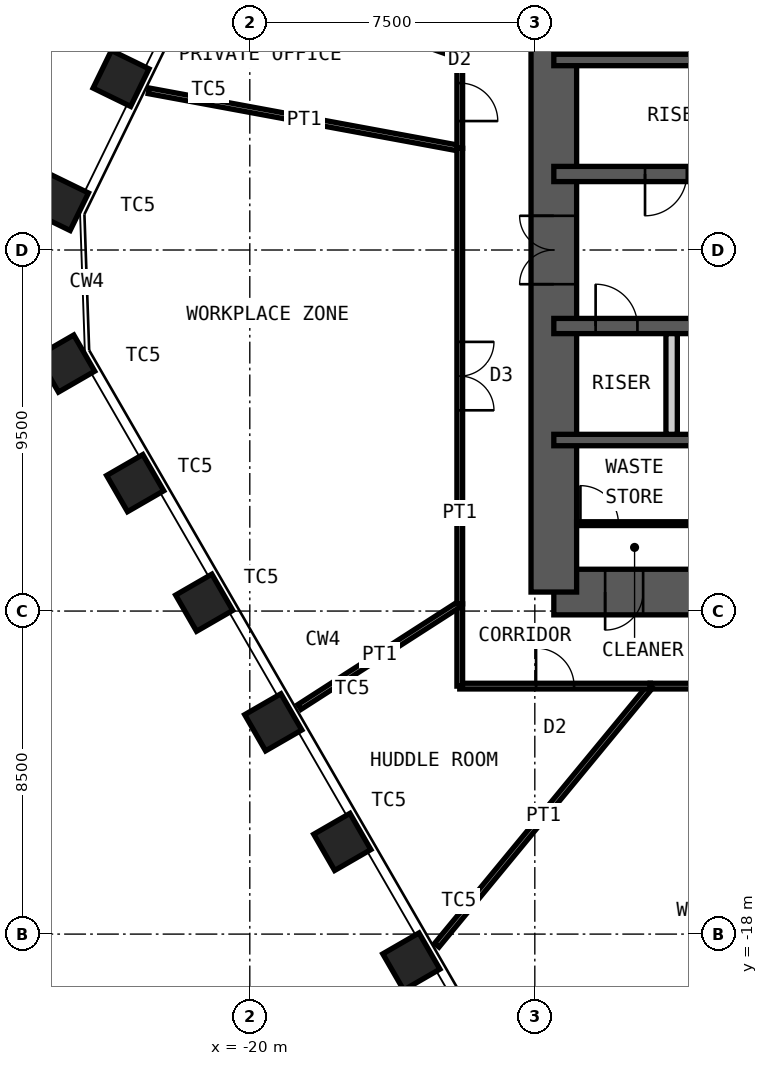
"""IFC4 building model, lengths in metres.
Left out: names, types, materials, properties, quantities, classifications, styles, units other than length and angle.
Written with IfcOpenShell. Run it as: python <this file> out.ifc"""

import sys

from ifc_helpers import new_model, si_unit, direction, frame, frame_2d, origin, origin_2d, place, context, subcontext, project, spatial, rectangle, hollow_rectangle, extrude, element, fill, save


model = new_model("IFC4")
c1 = context("Model", 3, precision=1e-05, world=origin(), true_north=direction((0.0, 1.0)))
c2 = subcontext(c1, "Body", "Model", "MODEL_VIEW")
j1 = project(units=[si_unit("LENGTHUNIT", "METRE"), si_unit("PLANEANGLEUNIT", "RADIAN")], contexts=[c1])
p1 = place(None, origin())
s1 = spatial("IfcSite", under=j1, at=p1, CompositionType="ELEMENT")
p2 = place(p1, origin())
s2 = spatial("IfcBuilding", under=s1, at=p2, CompositionType="ELEMENT")
p3 = place(p2, frame((0.0, 0.0, 193.0)))
s3 = spatial("IfcBuildingStorey", under=s2, at=p3, CompositionType="ELEMENT", Elevation=193.0)
for number, where, z_axis, x_axis in (
    (1, (-15.749, -18.721, 0.0), (0.0, 0.0, 1.0), (0.5, -0.866, 0.0)),
    (2, (-17.566, -15.574, 0.0), (0.0, 0.0, 1.0), (0.5, -0.866, 0.0)),
    (3, (-19.383, -12.428, 0.0), (0.0, 0.0, 1.0), (0.5, -0.866, 0.0)),
    (4, (-21.2, -9.281, 0.0), (0.0, 0.0, 1.0), (0.5, -0.866, 0.0)),
    (5, (-23.016, -6.134, 0.0), (0.0, 0.0, 1.0), (0.5, -0.866, 0.0)),
    (6, (-24.833, -2.988, 0.0), (0.0, 0.0, 1.0), (0.5, -0.866, 0.0)),
    (7, (-24.981, 1.248, 0.0), (0.0, 0.0, 1.0), (-0.438, -0.899, 0.0)),
    (8, (-23.388, 4.514, 0.0), (0.0, 0.0, 1.0), (-0.438, -0.899, 0.0)),
):
    element("IfcColumn", number, at=place(p3, frame(where, z_axis=z_axis, x_axis=x_axis)), inside=s3, PredefinedType="COLUMN", context=c2, shape_type="SweptSolid", body=[
        extrude(hollow_rectangle(XDim=1.1, YDim=1.1, WallThickness=0.07, at=origin_2d()), origin(), (0.0, 0.0, 1.0), 4.2),
    ])
p4 = place(p3, frame((-12.0, -9.0, 0.0), z_axis=(0.0, 0.0, 1.0), x_axis=(1.0, 0.0, 0.0)))
e9 = element("IfcWall", 9, at=p4, inside=s3, PredefinedType="SHEAR", context=c2, shape_type="SweptSolid", body=[
    extrude(rectangle(XDim=24.0, YDim=1.2, at=frame_2d((12.0, 0.0))), origin(), (0.0, 0.0, 1.0), 4.2),
])
p5 = place(p4, frame((1.35, 0.0, 0.0)))
e10 = element("IfcOpeningElement", 10, at=p5, cuts=e9, PredefinedType="OPENING", context=c2, shape_type="SweptSolid", body=[
    extrude(rectangle(XDim=1.0, YDim=2.1, at=frame_2d((0.5, 1.05))), frame((0.0, 0.61, 0.0), z_axis=(0.0, -1.0, 0.0), x_axis=(1.0, 0.0, 0.0)), (0.0, 0.0, 1.0), 1.22),
])
p6 = place(p4, frame((5.325, 0.0, 0.0)))
e11 = element("IfcOpeningElement", 11, at=p6, cuts=e9, PredefinedType="OPENING", context=c2, shape_type="SweptSolid", body=[
    extrude(rectangle(XDim=1.15, YDim=2.1, at=frame_2d((0.575, 1.05))), frame((0.0, 0.61, 0.0), z_axis=(0.0, -1.0, 0.0), x_axis=(1.0, 0.0, 0.0)), (0.0, 0.0, 1.0), 1.22),
])
p7 = place(p4, frame((12.6, 0.0, 0.0)))
e12 = element("IfcOpeningElement", 12, at=p7, cuts=e9, PredefinedType="OPENING", context=c2, shape_type="SweptSolid", body=[
    extrude(rectangle(XDim=1.0, YDim=2.1, at=frame_2d((0.5, 1.05))), frame((0.0, 0.61, 0.0), z_axis=(0.0, -1.0, 0.0), x_axis=(1.0, 0.0, 0.0)), (0.0, 0.0, 1.0), 1.22),
])
p8 = place(p3, frame((-12.0, -9.0, 0.0), z_axis=(0.0, 0.0, 1.0), x_axis=(0.0, 1.0, 0.0)))
e13 = element("IfcWall", 13, at=p8, inside=s3, PredefinedType="SHEAR", context=c2, shape_type="SweptSolid", body=[
    extrude(rectangle(XDim=18.0, YDim=1.2, at=frame_2d((9.0, 0.0))), origin(), (0.0, 0.0, 1.0), 4.2),
])
p9 = place(p8, frame((8.1, 0.0, 0.0)))
e14 = element("IfcOpeningElement", 14, at=p9, cuts=e13, PredefinedType="OPENING", context=c2, shape_type="SweptSolid", body=[
    extrude(rectangle(XDim=1.8, YDim=2.1, at=frame_2d((0.9, 1.05))), frame((0.0, 0.61, 0.0), z_axis=(0.0, -1.0, 0.0), x_axis=(1.0, 0.0, 0.0)), (0.0, 0.0, 1.0), 1.22),
])
p10 = place(p3, frame((-12.0, 5.0, 0.0), z_axis=(0.0, 0.0, 1.0), x_axis=(1.0, 0.0, 0.0)))
e15 = element("IfcWall", 15, at=p10, inside=s3, PredefinedType="SHEAR", context=c2, shape_type="SweptSolid", body=[
    extrude(rectangle(XDim=24.0, YDim=0.3, at=frame_2d((12.0, 0.0))), origin(), (0.0, 0.0, 1.0), 4.2),
])
p11 = place(p3, frame((-12.0, 2.0, 0.0), z_axis=(0.0, 0.0, 1.0), x_axis=(1.0, 0.0, 0.0)))
e16 = element("IfcWall", 16, at=p11, inside=s3, PredefinedType="SHEAR", context=c2, shape_type="SweptSolid", body=[
    extrude(rectangle(XDim=24.0, YDim=0.4, at=frame_2d((12.0, 0.0))), origin(), (0.0, 0.0, 1.0), 4.2),
])
p12 = place(p11, frame((2.4, 0.0, 0.0)))
e17 = element("IfcOpeningElement", 17, at=p12, cuts=e16, PredefinedType="OPENING", context=c2, shape_type="SweptSolid", body=[
    extrude(rectangle(XDim=1.1, YDim=2.1, at=frame_2d((0.55, 1.05))), frame((0.0, 0.21, 0.0), z_axis=(0.0, -1.0, 0.0), x_axis=(1.0, 0.0, 0.0)), (0.0, 0.0, 1.0), 0.42),
])
p13 = place(p11, frame((22.0, 0.0, 0.0)))
e18 = element("IfcOpeningElement", 18, at=p13, cuts=e16, PredefinedType="OPENING", context=c2, shape_type="SweptSolid", body=[
    extrude(rectangle(XDim=1.1, YDim=2.1, at=frame_2d((0.55, 1.05))), frame((0.0, 0.21, 0.0), z_axis=(0.0, -1.0, 0.0), x_axis=(1.0, 0.0, 0.0)), (0.0, 0.0, 1.0), 0.42),
])
p14 = place(p11, frame((10.15, 0.0, 0.0)))
e19 = element("IfcOpeningElement", 19, at=p14, cuts=e16, PredefinedType="OPENING", context=c2, shape_type="SweptSolid", body=[
    extrude(rectangle(XDim=1.0, YDim=2.1, at=frame_2d((0.5, 1.05))), frame((0.0, 0.21, 0.0), z_axis=(0.0, -1.0, 0.0), x_axis=(1.0, 0.0, 0.0)), (0.0, 0.0, 1.0), 0.42),
])
p15 = place(p11, frame((6.9, 0.0, 0.0)))
e20 = element("IfcOpeningElement", 20, at=p15, cuts=e16, PredefinedType="OPENING", context=c2, shape_type="SweptSolid", body=[
    extrude(rectangle(XDim=1.0, YDim=2.1, at=frame_2d((0.5, 1.05))), frame((0.0, 0.21, 0.0), z_axis=(0.0, -1.0, 0.0), x_axis=(1.0, 0.0, 0.0)), (0.0, 0.0, 1.0), 0.42),
])
p16 = place(p11, frame((13.35, 0.0, 0.0)))
e21 = element("IfcOpeningElement", 21, at=p16, cuts=e16, PredefinedType="OPENING", context=c2, shape_type="SweptSolid", body=[
    extrude(rectangle(XDim=1.1, YDim=2.4, at=frame_2d((0.55, 1.2))), frame((0.0, 0.21, 0.0), z_axis=(0.0, -1.0, 0.0), x_axis=(1.0, 0.0, 0.0)), (0.0, 0.0, 1.0), 0.42),
])
p17 = place(p11, frame((16.15, 0.0, 0.0)))
e22 = element("IfcOpeningElement", 22, at=p17, cuts=e16, PredefinedType="OPENING", context=c2, shape_type="SweptSolid", body=[
    extrude(rectangle(XDim=1.1, YDim=2.4, at=frame_2d((0.55, 1.2))), frame((0.0, 0.21, 0.0), z_axis=(0.0, -1.0, 0.0), x_axis=(1.0, 0.0, 0.0)), (0.0, 0.0, 1.0), 0.42),
])
p18 = place(p11, frame((18.95, 0.0, 0.0)))
e23 = element("IfcOpeningElement", 23, at=p18, cuts=e16, PredefinedType="OPENING", context=c2, shape_type="SweptSolid", body=[
    extrude(rectangle(XDim=1.1, YDim=2.4, at=frame_2d((0.55, 1.2))), frame((0.0, 0.21, 0.0), z_axis=(0.0, -1.0, 0.0), x_axis=(1.0, 0.0, 0.0)), (0.0, 0.0, 1.0), 0.42),
])
p19 = place(p3, frame((-12.0, -2.0, 0.0), z_axis=(0.0, 0.0, 1.0), x_axis=(1.0, 0.0, 0.0)))
e24 = element("IfcWall", 24, at=p19, inside=s3, PredefinedType="SHEAR", context=c2, shape_type="SweptSolid", body=[
    extrude(rectangle(XDim=24.0, YDim=0.4, at=frame_2d((12.0, 0.0))), origin(), (0.0, 0.0, 1.0), 4.2),
])
p20 = place(p19, frame((1.1, 0.0, 0.0)))
e25 = element("IfcOpeningElement", 25, at=p20, cuts=e24, PredefinedType="OPENING", context=c2, shape_type="SweptSolid", body=[
    extrude(rectangle(XDim=1.1, YDim=2.1, at=frame_2d((0.55, 1.05))), frame((0.0, 0.21, 0.0), z_axis=(0.0, -1.0, 0.0), x_axis=(1.0, 0.0, 0.0)), (0.0, 0.0, 1.0), 0.42),
])
p21 = place(p19, frame((13.55, 0.0, 0.0)))
e26 = element("IfcOpeningElement", 26, at=p21, cuts=e24, PredefinedType="OPENING", context=c2, shape_type="SweptSolid", body=[
    extrude(rectangle(XDim=1.1, YDim=2.1, at=frame_2d((0.55, 1.05))), frame((0.0, 0.21, 0.0), z_axis=(0.0, -1.0, 0.0), x_axis=(1.0, 0.0, 0.0)), (0.0, 0.0, 1.0), 0.42),
])
p22 = place(p19, frame((20.7, 0.0, 0.0)))
e27 = element("IfcOpeningElement", 27, at=p22, cuts=e24, PredefinedType="OPENING", context=c2, shape_type="SweptSolid", body=[
    extrude(rectangle(XDim=1.1, YDim=2.1, at=frame_2d((0.55, 1.05))), frame((0.0, 0.21, 0.0), z_axis=(0.0, -1.0, 0.0), x_axis=(1.0, 0.0, 0.0)), (0.0, 0.0, 1.0), 0.42),
])
p23 = place(p19, frame((4.0, 0.0, 0.0)))
e28 = element("IfcOpeningElement", 28, at=p23, cuts=e24, PredefinedType="OPENING", context=c2, shape_type="SweptSolid", body=[
    extrude(rectangle(XDim=1.0, YDim=2.1, at=frame_2d((0.5, 1.05))), frame((0.0, 0.21, 0.0), z_axis=(0.0, -1.0, 0.0), x_axis=(1.0, 0.0, 0.0)), (0.0, 0.0, 1.0), 0.42),
])
p24 = place(p19, frame((6.8, 0.0, 0.0)))
e29 = element("IfcOpeningElement", 29, at=p24, cuts=e24, PredefinedType="OPENING", context=c2, shape_type="SweptSolid", body=[
    extrude(rectangle(XDim=1.0, YDim=2.1, at=frame_2d((0.5, 1.05))), frame((0.0, 0.21, 0.0), z_axis=(0.0, -1.0, 0.0), x_axis=(1.0, 0.0, 0.0)), (0.0, 0.0, 1.0), 0.42),
])
p25 = place(p3, frame((-12.0, -5.0, 0.0), z_axis=(0.0, 0.0, 1.0), x_axis=(1.0, 0.0, 0.0)))
e30 = element("IfcWall", 30, at=p25, inside=s3, PredefinedType="SHEAR", context=c2, shape_type="SweptSolid", body=[
    extrude(rectangle(XDim=24.0, YDim=0.3, at=frame_2d((12.0, 0.0))), origin(), (0.0, 0.0, 1.0), 4.2),
])
p26 = place(p3, frame((-8.9, -4.85, 0.0), z_axis=(0.0, 0.0, 1.0), x_axis=(0.0, 1.0, 0.0)))
e31 = element("IfcWall", 31, at=p26, inside=s3, PredefinedType="PARTITIONING", context=c2, shape_type="SweptSolid", body=[
    extrude(rectangle(XDim=2.65, YDim=0.3, at=frame_2d((1.325, 0.0))), origin(), (0.0, 0.0, 1.0), 3.98),
])
p27 = place(p3, frame((-11.4, -7.2, 0.0), z_axis=(0.0, 0.0, 1.0), x_axis=(1.0, 0.0, 0.0)))
e32 = element("IfcWall", 32, at=p27, inside=s3, PredefinedType="PARTITIONING", context=c2, shape_type="SweptSolid", body=[
    extrude(rectangle(XDim=3.05, YDim=0.1, at=frame_2d((1.525, 0.0))), origin(), (0.0, 0.0, 1.0), 3.98),
])
p28 = place(p27, frame((0.1, 0.0, 0.0)))
e33 = element("IfcOpeningElement", 33, at=p28, cuts=e32, PredefinedType="OPENING", context=c2, shape_type="SweptSolid", body=[
    extrude(rectangle(XDim=1.0, YDim=2.4, at=frame_2d((0.5, 1.2))), frame((0.0, 0.06, 0.0), z_axis=(0.0, -1.0, 0.0), x_axis=(1.0, 0.0, 0.0)), (0.0, 0.0, 1.0), 0.12),
])
p29 = place(p3, frame((-22.661, 4.189, 0.0), z_axis=(0.0, 0.0, 1.0), x_axis=(0.983345347199, -0.181746879316, 0.0)))
e34 = element("IfcWall", 34, at=p29, inside=s3, PredefinedType="PARTITIONING", context=c2, shape_type="SweptSolid", body=[
    extrude(rectangle(XDim=8.324, YDim=0.15, at=frame_2d((4.162, 0.0))), origin(), (0.0, 0.0, 1.0), 3.43),
])
p30 = place(p3, frame((-14.475, 2.676, 0.0), z_axis=(0.0, 0.0, 1.0), x_axis=(0.0, 1.0, 0.0)))
e35 = element("IfcWall", 35, at=p30, inside=s3, PredefinedType="PARTITIONING", context=c2, shape_type="SweptSolid", body=[
    extrude(rectangle(XDim=2.435, YDim=0.15, at=frame_2d((1.217, 0.0))), origin(), (0.0, 0.0, 1.0), 4.03),
])
p31 = place(p30, frame((0.717, 0.0, 0.0)))
e36 = element("IfcOpeningElement", 36, at=p31, cuts=e35, PredefinedType="OPENING", context=c2, shape_type="SweptSolid", body=[
    extrude(rectangle(XDim=1.0, YDim=2.4, at=frame_2d((0.5, 1.2))), frame((0.0, 0.085, 0.0), z_axis=(0.0, -1.0, 0.0), x_axis=(1.0, 0.0, 0.0)), (0.0, 0.0, 1.0), 0.17),
])
p32 = place(p3, frame((-21.072, 7.439, 0.0), z_axis=(0.0, 0.0, 1.0), x_axis=(0.94295553867, -0.332918686907, 0.0)))
e37 = element("IfcWall", 37, at=p32, inside=s3, PredefinedType="PARTITIONING", context=c2, shape_type="SweptSolid", body=[
    extrude(rectangle(XDim=6.996, YDim=0.15, at=frame_2d((3.498, 0.0))), origin(), (0.0, 0.0, 1.0), 3.43),
])
p33 = place(p3, frame((-14.475, 5.11, 0.0), z_axis=(0.0, 0.0, 1.0), x_axis=(0.0, 1.0, 0.0)))
e38 = element("IfcWall", 38, at=p33, inside=s3, PredefinedType="PARTITIONING", context=c2, shape_type="SweptSolid", body=[
    extrude(rectangle(XDim=2.831, YDim=0.15, at=frame_2d((1.416, 0.0))), origin(), (0.0, 0.0, 1.0), 4.03),
])
p34 = place(p33, frame((0.916, 0.0, 0.0)))
e39 = element("IfcOpeningElement", 39, at=p34, cuts=e38, PredefinedType="OPENING", context=c2, shape_type="SweptSolid", body=[
    extrude(rectangle(XDim=1.0, YDim=2.4, at=frame_2d((0.5, 1.2))), frame((0.0, 0.085, 0.0), z_axis=(0.0, -1.0, 0.0), x_axis=(1.0, 0.0, 0.0)), (0.0, 0.0, 1.0), 0.17),
])
p35 = place(p3, frame((4.07, -11.475, 0.0), z_axis=(0.0, 0.0, 1.0), x_axis=(-1.0, 0.0, 0.0)))
e40 = element("IfcWall", 40, at=p35, inside=s3, PredefinedType="PARTITIONING", context=c2, shape_type="SweptSolid", body=[
    extrude(rectangle(XDim=13.528, YDim=0.15, at=frame_2d((6.764, 0.0))), origin(), (0.0, 0.0, 1.0), 4.03),
])
p36 = place(p35, frame((5.864, 0.0, 0.0)))
e41 = element("IfcOpeningElement", 41, at=p36, cuts=e40, PredefinedType="OPENING", context=c2, shape_type="SweptSolid", body=[
    extrude(rectangle(XDim=1.8, YDim=2.4, at=frame_2d((0.9, 1.2))), frame((0.0, 0.085, 0.0), z_axis=(0.0, -1.0, 0.0), x_axis=(1.0, 0.0, 0.0)), (0.0, 0.0, 1.0), 0.17),
])
p37 = place(p3, frame((-15.08, -18.294, 0.0), z_axis=(0.0, 0.0, 1.0), x_axis=(0.636052894953, 0.771645459277, 0.0)))
e42 = element("IfcWall", 42, at=p37, inside=s3, PredefinedType="PARTITIONING", context=c2, shape_type="SweptSolid", body=[
    extrude(rectangle(XDim=8.837, YDim=0.15, at=frame_2d((4.418, 0.0))), origin(), (0.0, 0.0, 1.0), 3.43),
])
p38 = place(p3, frame((-9.459, -11.475, 0.0), z_axis=(0.0, 0.0, 1.0), x_axis=(-1.0, 0.0, 0.0)))
e43 = element("IfcWall", 43, at=p38, inside=s3, PredefinedType="PARTITIONING", context=c2, shape_type="SweptSolid", body=[
    extrude(rectangle(XDim=5.016, YDim=0.15, at=frame_2d((2.508, 0.0))), origin(), (0.0, 0.0, 1.0), 4.03),
])
p39 = place(p38, frame((2.008, 0.0, 0.0)))
e44 = element("IfcOpeningElement", 44, at=p39, cuts=e43, PredefinedType="OPENING", context=c2, shape_type="SweptSolid", body=[
    extrude(rectangle(XDim=1.0, YDim=2.4, at=frame_2d((0.5, 1.2))), frame((0.0, 0.085, 0.0), z_axis=(0.0, -1.0, 0.0), x_axis=(1.0, 0.0, 0.0)), (0.0, 0.0, 1.0), 0.17),
])
p40 = place(p3, frame((-14.475, -11.475, 0.0), z_axis=(0.0, 0.0, 1.0), x_axis=(0.0, 1.0, 0.0)))
e45 = element("IfcWall", 45, at=p40, inside=s3, PredefinedType="PARTITIONING", context=c2, shape_type="SweptSolid", body=[
    extrude(rectangle(XDim=2.164, YDim=0.15, at=frame_2d((1.082, 0.0))), origin(), (0.0, 0.0, 1.0), 4.03),
])
p41 = place(p3, frame((-18.693, -12.024, 0.0), z_axis=(0.0, 0.0, 1.0), x_axis=(0.841031335058, 0.540986407824, 0.0)))
e46 = element("IfcWall", 46, at=p41, inside=s3, PredefinedType="PARTITIONING", context=c2, shape_type="SweptSolid", body=[
    extrude(rectangle(XDim=5.015, YDim=0.15, at=frame_2d((2.507, 0.0))), origin(), (0.0, 0.0, 1.0), 3.43),
])
p42 = place(p3, frame((-14.475, -9.311, 0.0), z_axis=(0.0, 0.0, 1.0), x_axis=(0.0, 1.0, 0.0)))
e47 = element("IfcWall", 47, at=p42, inside=s3, PredefinedType="PARTITIONING", context=c2, shape_type="SweptSolid", body=[
    extrude(rectangle(XDim=11.987, YDim=0.15, at=frame_2d((5.993, 0.0))), origin(), (0.0, 0.0, 1.0), 4.03),
])
p43 = place(p42, frame((5.093, 0.0, 0.0)))
e48 = element("IfcOpeningElement", 48, at=p43, cuts=e47, PredefinedType="OPENING", context=c2, shape_type="SweptSolid", body=[
    extrude(rectangle(XDim=1.8, YDim=2.4, at=frame_2d((0.9, 1.2))), frame((0.0, 0.085, 0.0), z_axis=(0.0, -1.0, 0.0), x_axis=(1.0, 0.0, 0.0)), (0.0, 0.0, 1.0), 0.17),
])
p44 = place(p5, origin())
e49 = element("IfcDoor", 49, at=p44, inside=s3, OperationType="SINGLE_SWING_LEFT", PredefinedType="DOOR", context=c2, shape_type="SweptSolid", body=[
    extrude(rectangle(XDim=1.0, YDim=2.1, at=frame_2d((0.5, 1.05))), frame((0.0, 0.025, 0.0), z_axis=(0.0, -1.0, 0.0), x_axis=(1.0, 0.0, 0.0)), (0.0, 0.0, 1.0), 0.05),
])
fill(e10, e49)
p45 = place(p12, origin())
e50 = element("IfcDoor", 50, at=p45, inside=s3, OperationType="SINGLE_SWING_LEFT", PredefinedType="DOOR", context=c2, shape_type="SweptSolid", body=[
    extrude(rectangle(XDim=1.1, YDim=2.1, at=frame_2d((0.55, 1.05))), frame((0.0, 0.025, 0.0), z_axis=(0.0, -1.0, 0.0), x_axis=(1.0, 0.0, 0.0)), (0.0, 0.0, 1.0), 0.05),
])
fill(e17, e50)
p46 = place(p20, origin())
e51 = element("IfcDoor", 51, at=p46, inside=s3, OperationType="SINGLE_SWING_RIGHT", PredefinedType="DOOR", context=c2, shape_type="SweptSolid", body=[
    extrude(rectangle(XDim=1.1, YDim=2.1, at=frame_2d((0.55, 1.05))), frame((0.0, 0.025, 0.0), z_axis=(0.0, -1.0, 0.0), x_axis=(1.0, 0.0, 0.0)), (0.0, 0.0, 1.0), 0.05),
])
fill(e25, e51)
p47 = place(p9, origin())
e52 = element("IfcDoor", 52, at=p47, inside=s3, OperationType="DOUBLE_DOOR_DOUBLE_SWING", PredefinedType="DOOR", context=c2, shape_type="SweptSolid", body=[
    extrude(rectangle(XDim=1.8, YDim=2.1, at=frame_2d((0.9, 1.05))), frame((0.0, 0.025, 0.0), z_axis=(0.0, -1.0, 0.0), x_axis=(1.0, 0.0, 0.0)), (0.0, 0.0, 1.0), 0.05),
])
fill(e14, e52)
p48 = place(p28, origin())
e53 = element("IfcDoor", 53, at=p48, inside=s3, OperationType="SINGLE_SWING_RIGHT", PredefinedType="DOOR", context=c2, shape_type="SweptSolid", body=[
    extrude(rectangle(XDim=1.0, YDim=2.4, at=frame_2d((0.5, 1.2))), frame((0.0, 0.025, 0.0), z_axis=(0.0, -1.0, 0.0), x_axis=(1.0, 0.0, 0.0)), (0.0, 0.0, 1.0), 0.05),
])
fill(e33, e53)
p49 = place(p31, origin())
e54 = element("IfcDoor", 54, at=p49, inside=s3, OperationType="SINGLE_SWING_LEFT", PredefinedType="DOOR", context=c2, shape_type="SweptSolid", body=[
    extrude(rectangle(XDim=1.0, YDim=2.4, at=frame_2d((0.5, 1.2))), frame((0.0, 0.025, 0.0), z_axis=(0.0, -1.0, 0.0), x_axis=(1.0, 0.0, 0.0)), (0.0, 0.0, 1.0), 0.05),
])
fill(e36, e54)
p50 = place(p39, origin())
e55 = element("IfcDoor", 55, at=p50, inside=s3, OperationType="SINGLE_SWING_RIGHT", PredefinedType="DOOR", context=c2, shape_type="SweptSolid", body=[
    extrude(rectangle(XDim=1.0, YDim=2.4, at=frame_2d((0.5, 1.2))), frame((0.0, 0.025, 0.0), z_axis=(0.0, -1.0, 0.0), x_axis=(1.0, 0.0, 0.0)), (0.0, 0.0, 1.0), 0.05),
])
fill(e44, e55)
p51 = place(p43, origin())
e56 = element("IfcDoor", 56, at=p51, inside=s3, OperationType="DOUBLE_DOOR_DOUBLE_SWING", PredefinedType="DOOR", context=c2, shape_type="SweptSolid", body=[
    extrude(rectangle(XDim=1.8, YDim=2.4, at=frame_2d((0.9, 1.2))), frame((0.0, 0.025, 0.0), z_axis=(0.0, -1.0, 0.0), x_axis=(1.0, 0.0, 0.0)), (0.0, 0.0, 1.0), 0.05),
])
fill(e48, e56)
save(model, sys.argv[1])
